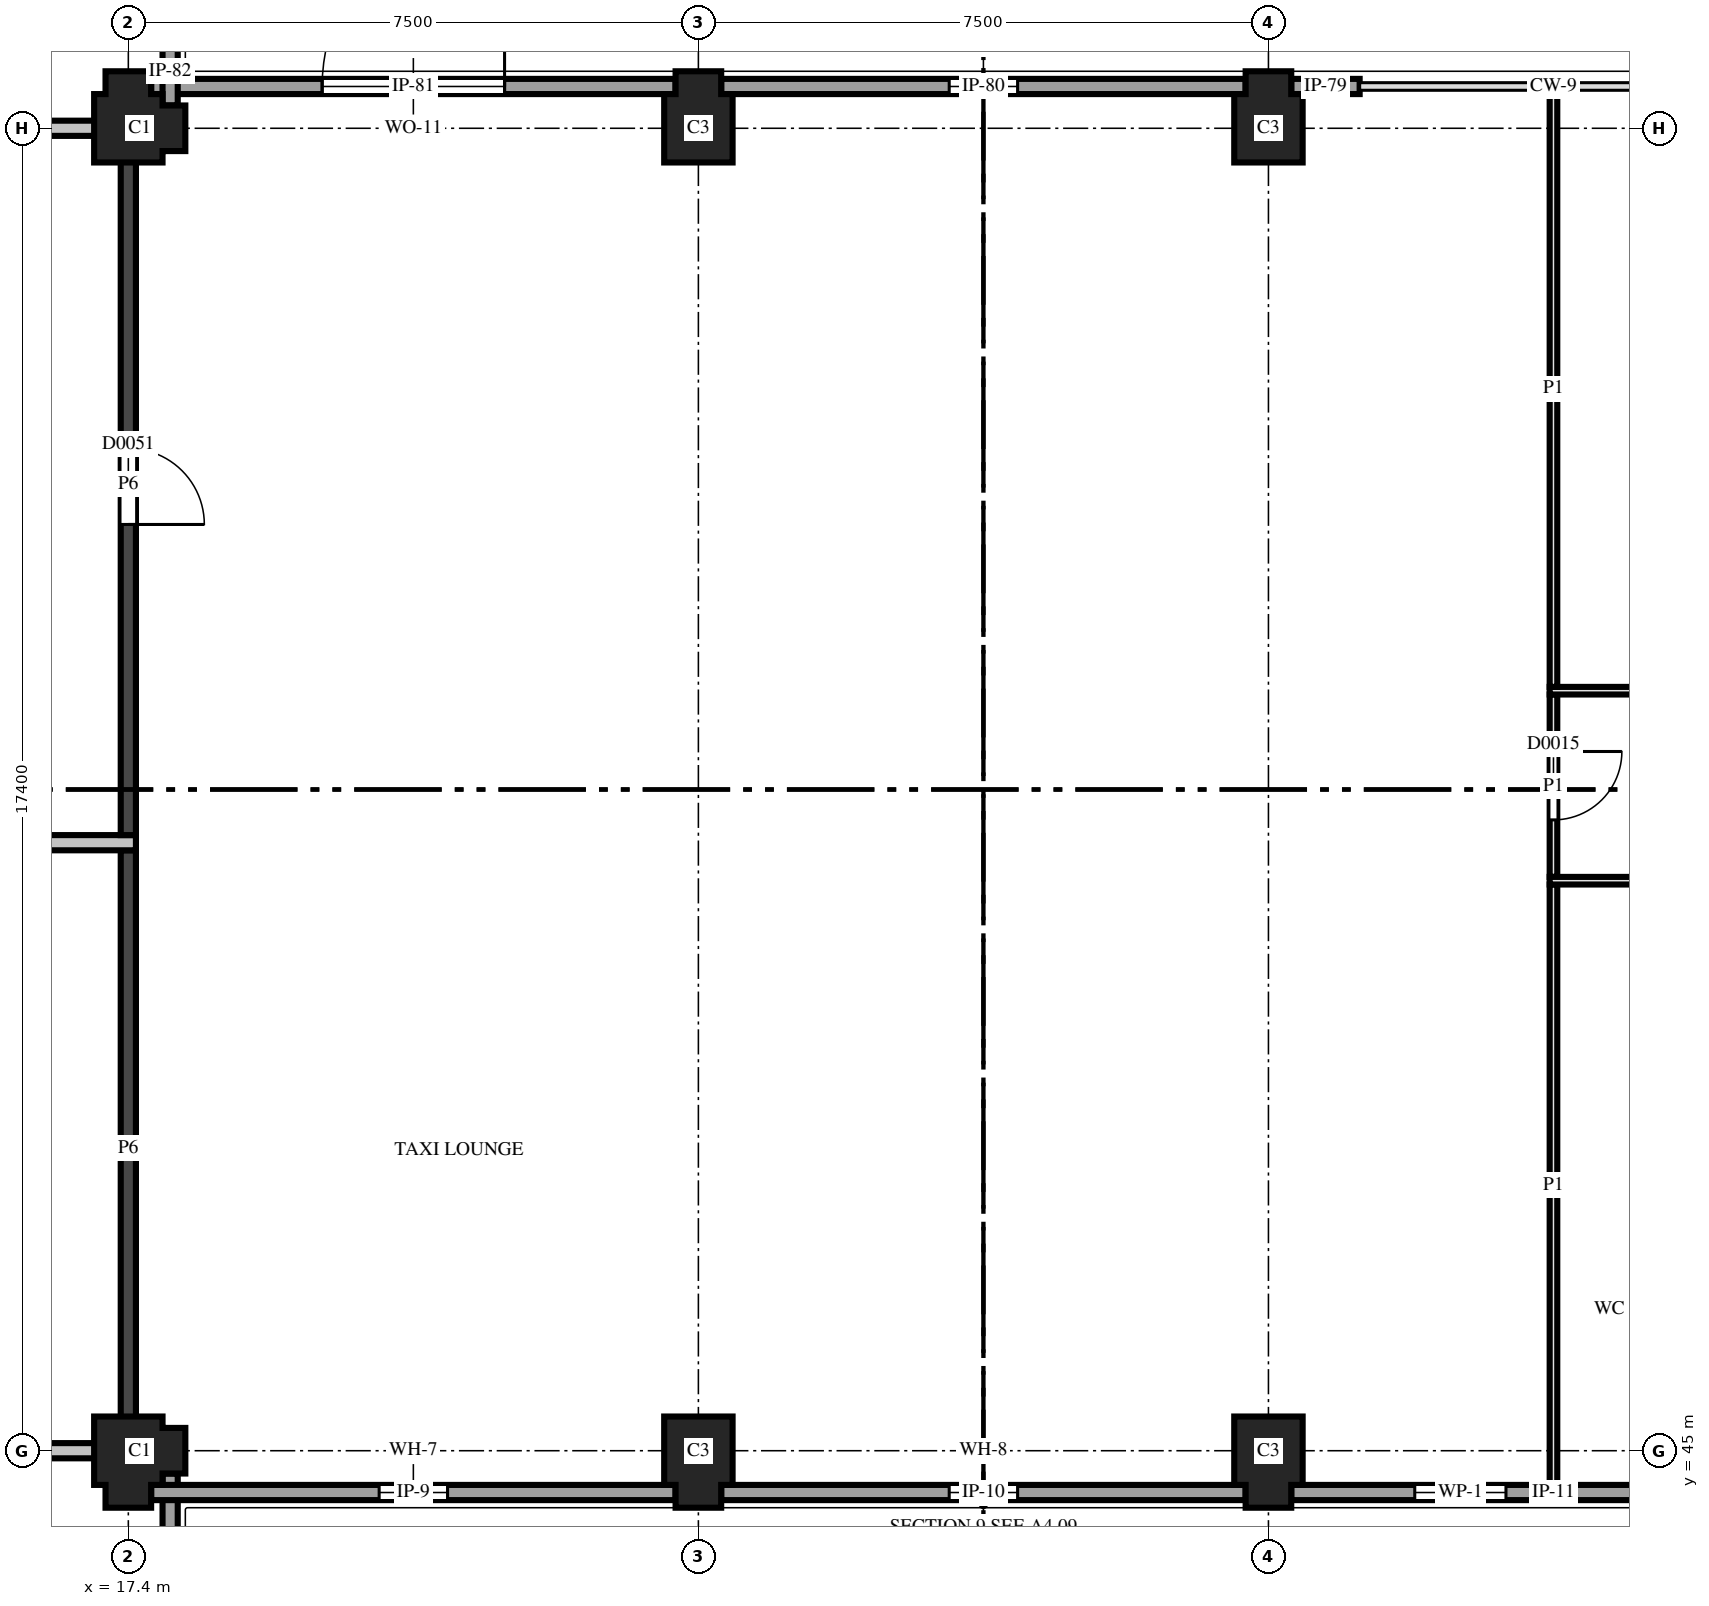
"""IFC4 building model, lengths in metres.
Left out: names, types, materials, properties, quantities, classifications, styles, units other than length and angle.
Written with IfcOpenShell. Run it as: python <this file> out.ifc"""

import sys

from ifc_helpers import new_model, si_unit, direction, frame, frame_2d, origin, place, context, subcontext, project, spatial, polyline, rectangle, outline, extrude, element, fill, save


model = new_model("IFC4")
c1 = context("Model", 3, precision=1e-05, world=origin(), true_north=direction((0.0, 1.0)))
c2 = subcontext(c1, "Body", "Model", "MODEL_VIEW")
j1 = project(units=[si_unit("LENGTHUNIT", "METRE"), si_unit("PLANEANGLEUNIT", "RADIAN")], contexts=[c1])
p1 = place(None, origin())
s1 = spatial("IfcSite", under=j1, at=p1, CompositionType="ELEMENT")
p2 = place(p1, origin())
s2 = spatial("IfcBuilding", under=s1, at=p2, CompositionType="ELEMENT")
p3 = place(p2, origin())
s3 = spatial("IfcBuildingStorey", under=s2, at=p3, CompositionType="ELEMENT", Elevation=0.0)
p4 = place(p3, frame((17.4, 45.0, 0.0), z_axis=(0.0, 0.0, 1.0), x_axis=(0.0, -1.0, 0.0)))
e1 = element("IfcColumn", 1, at=p4, inside=s3, PredefinedType="COLUMN", context=c2, shape_type="SweptSolid", body=[
    extrude(outline(polyline([(-0.45, -0.45), (0.45, -0.45), (0.45, -0.3), (0.75, -0.3), (0.75, 0.3), (0.45, 0.3), (0.45, 0.45), (0.3, 0.45), (0.3, 0.75), (-0.3, 0.75), (-0.3, 0.45), (-0.45, 0.45), (-0.45, -0.45)])), origin(), (0.0, 0.0, 1.0), 4.5),
])
for number, where, z_axis, x_axis in (
    (2, (24.9, 45.0, 0.0), (0.0, 0.0, 1.0), (0.0, -1.0, 0.0)),
    (3, (32.4, 45.0, 0.0), (0.0, 0.0, 1.0), (0.0, -1.0, 0.0)),
):
    element("IfcColumn", number, at=place(p3, frame(where, z_axis=z_axis, x_axis=x_axis)), inside=s3, PredefinedType="COLUMN", context=c2, shape_type="SweptSolid", body=[
        extrude(outline(polyline([(-0.45, -0.45), (0.45, -0.45), (0.45, -0.3), (0.75, -0.3), (0.75, 0.3), (0.45, 0.3), (0.45, 0.45), (-0.45, 0.45), (-0.45, -0.45)])), origin(), (0.0, 0.0, 1.0), 4.5),
    ])
p5 = place(p3, frame((17.4, 62.4, 0.0), z_axis=(0.0, 0.0, 1.0), x_axis=(1.0, 0.0, 0.0)))
e4 = element("IfcColumn", 4, at=p5, inside=s3, PredefinedType="COLUMN", context=c2, shape_type="SweptSolid", body=[
    extrude(outline(polyline([(-0.45, -0.45), (0.45, -0.45), (0.45, -0.3), (0.75, -0.3), (0.75, 0.3), (0.45, 0.3), (0.45, 0.45), (0.3, 0.45), (0.3, 0.75), (-0.3, 0.75), (-0.3, 0.45), (-0.45, 0.45), (-0.45, -0.45)])), origin(), (0.0, 0.0, 1.0), 4.5),
])
for number, where, z_axis, x_axis in (
    (5, (24.9, 62.4, 0.0), (0.0, 0.0, 1.0), (0.0, 1.0, 0.0)),
    (6, (32.4, 62.4, 0.0), (0.0, 0.0, 1.0), (0.0, 1.0, 0.0)),
):
    element("IfcColumn", number, at=place(p3, frame(where, z_axis=z_axis, x_axis=x_axis)), inside=s3, PredefinedType="COLUMN", context=c2, shape_type="SweptSolid", body=[
        extrude(outline(polyline([(-0.45, -0.45), (0.45, -0.45), (0.45, -0.3), (0.75, -0.3), (0.75, 0.3), (0.45, 0.3), (0.45, 0.45), (-0.45, 0.45), (-0.45, -0.45)])), origin(), (0.0, 0.0, 1.0), 4.5),
    ])
p6 = place(p3, frame((17.95, 37.8, 0.0), z_axis=(0.0, 0.0, 1.0), x_axis=(0.0, 1.0, 0.0)))
e7 = element("IfcWall", 7, at=p6, inside=s3, PredefinedType="SOLIDWALL", context=c2, shape_type="SweptSolid", body=[
    extrude(outline(polyline([(0.0, 0.0), (6.9, 0.0), (6.9, 3.1), (6.002, 3.1), (6.0, 2.4), (5.681, 2.56), (5.363, 2.695), (5.044, 2.806), (4.725, 2.895), (4.406, 2.963), (4.087, 3.012), (3.769, 3.041), (3.45, 3.05), (3.131, 3.041), (2.812, 3.012), (2.494, 2.963), (2.175, 2.895), (1.856, 2.806), (1.538, 2.695), (1.219, 2.56), (0.9, 2.4), (0.898, 3.1), (0.0, 3.1), (0.0, 0.0)])), frame((0.0, 0.1, 0.0), z_axis=(0.0, -1.0, 0.0), x_axis=(1.0, 0.0, 0.0)), (0.0, 0.0, 1.0), 0.2),
])
p7 = place(p6, frame((3.0, 0.0, 2.4)))
e8 = element("IfcOpeningElement", 8, at=p7, cuts=e7, PredefinedType="OPENING", context=c2, shape_type="SweptSolid", body=[
    extrude(rectangle(XDim=0.9, YDim=0.531, at=frame_2d((0.45, 0.266))), frame((0.0, 0.11, 0.0), z_axis=(0.0, -1.0, 0.0), x_axis=(1.0, 0.0, 0.0)), (0.0, 0.0, 1.0), 0.22),
])
p8 = place(p3, frame((17.7, 44.45, 0.0), z_axis=(0.0, 0.0, 1.0), x_axis=(1.0, 0.0, 0.0)))
e9 = element("IfcWall", 9, at=p8, inside=s3, PredefinedType="SOLIDWALL", context=c2, shape_type="SweptSolid", body=[
    extrude(outline(polyline([(0.0, 0.0), (6.9, 0.0), (6.9, 3.1), (6.002, 3.1), (6.0, 2.4), (5.681, 2.56), (5.363, 2.695), (5.044, 2.806), (4.725, 2.895), (4.406, 2.963), (4.087, 3.012), (3.769, 3.041), (3.45, 3.05), (3.131, 3.041), (2.812, 3.012), (2.494, 2.963), (2.175, 2.895), (1.856, 2.806), (1.538, 2.695), (1.219, 2.56), (0.9, 2.4), (0.898, 3.1), (0.0, 3.1), (0.0, 0.0)])), frame((0.0, 0.1, 0.0), z_axis=(0.0, -1.0, 0.0), x_axis=(1.0, 0.0, 0.0)), (0.0, 0.0, 1.0), 0.2),
])
p9 = place(p8, frame((3.0, 0.0, 2.4)))
e10 = element("IfcOpeningElement", 10, at=p9, cuts=e9, PredefinedType="OPENING", context=c2, shape_type="SweptSolid", body=[
    extrude(rectangle(XDim=0.9, YDim=0.531, at=frame_2d((0.45, 0.266))), frame((0.0, 0.11, 0.0), z_axis=(0.0, -1.0, 0.0), x_axis=(1.0, 0.0, 0.0)), (0.0, 0.0, 1.0), 0.22),
])
p10 = place(p3, frame((25.2, 44.45, 0.0), z_axis=(0.0, 0.0, 1.0), x_axis=(1.0, 0.0, 0.0)))
e11 = element("IfcWall", 11, at=p10, inside=s3, PredefinedType="SOLIDWALL", context=c2, shape_type="SweptSolid", body=[
    extrude(outline(polyline([(0.0, 0.0), (6.9, 0.0), (6.9, 3.1), (6.002, 3.1), (6.0, 2.4), (5.681, 2.56), (5.363, 2.695), (5.044, 2.806), (4.725, 2.895), (4.406, 2.963), (4.087, 3.012), (3.769, 3.041), (3.45, 3.05), (3.131, 3.041), (2.812, 3.012), (2.494, 2.963), (2.175, 2.895), (1.856, 2.806), (1.538, 2.695), (1.219, 2.56), (0.9, 2.4), (0.898, 3.1), (0.0, 3.1), (0.0, 0.0)])), frame((0.0, 0.1, 0.0), z_axis=(0.0, -1.0, 0.0), x_axis=(1.0, 0.0, 0.0)), (0.0, 0.0, 1.0), 0.2),
])
p11 = place(p10, frame((3.0, 0.0, 2.4)))
e12 = element("IfcOpeningElement", 12, at=p11, cuts=e11, PredefinedType="OPENING", context=c2, shape_type="SweptSolid", body=[
    extrude(rectangle(XDim=0.9, YDim=0.531, at=frame_2d((0.45, 0.266))), frame((0.0, 0.11, 0.0), z_axis=(0.0, -1.0, 0.0), x_axis=(1.0, 0.0, 0.0)), (0.0, 0.0, 1.0), 0.22),
])
p12 = place(p3, frame((32.7, 44.45, 0.0), z_axis=(0.0, 0.0, 1.0), x_axis=(1.0, 0.0, 0.0)))
e13 = element("IfcWall", 13, at=p12, inside=s3, PredefinedType="SOLIDWALL", context=c2, shape_type="SweptSolid", body=[
    extrude(outline(polyline([(0.0, 0.0), (6.9, 0.0), (6.9, 3.1), (6.002, 3.1), (6.0, 2.4), (5.681, 2.56), (5.363, 2.695), (5.044, 2.806), (4.725, 2.895), (4.406, 2.963), (4.087, 3.012), (3.769, 3.041), (3.45, 3.05), (3.131, 3.041), (2.812, 3.012), (2.494, 2.963), (2.175, 2.895), (1.856, 2.806), (1.538, 2.695), (1.219, 2.56), (0.9, 2.4), (0.898, 3.1), (0.0, 3.1), (0.0, 0.0)])), frame((0.0, 0.1, 0.0), z_axis=(0.0, -1.0, 0.0), x_axis=(1.0, 0.0, 0.0)), (0.0, 0.0, 1.0), 0.2),
])
p13 = place(p12, frame((1.625, 0.0, 0.6)))
e14 = element("IfcOpeningElement", 14, at=p13, cuts=e13, PredefinedType="OPENING", context=c2, shape_type="SweptSolid", body=[
    extrude(rectangle(XDim=1.2, YDim=1.2, at=frame_2d((0.6, 0.6))), frame((0.0, 0.11, 0.0), z_axis=(0.0, -1.0, 0.0), x_axis=(1.0, 0.0, 0.0)), (0.0, 0.0, 1.0), 0.22),
])
p14 = place(p3, frame((33.6, 62.95, 0.0), z_axis=(0.0, 0.0, 1.0), x_axis=(-1.0, 0.0, 0.0)))
e15 = element("IfcWall", 15, at=p14, inside=s3, PredefinedType="SOLIDWALL", context=c2, shape_type="SweptSolid", body=[
    extrude(rectangle(XDim=0.9, YDim=0.2, at=frame_2d((0.45, 0.0))), origin(), (0.0, 0.0, 1.0), 3.1),
])
p15 = place(p3, frame((32.1, 62.95, 0.0), z_axis=(0.0, 0.0, 1.0), x_axis=(-1.0, 0.0, 0.0)))
e16 = element("IfcWall", 16, at=p15, inside=s3, PredefinedType="SOLIDWALL", context=c2, shape_type="SweptSolid", body=[
    extrude(outline(polyline([(0.0, 0.0), (6.9, 0.0), (6.9, 3.1), (6.002, 3.1), (6.0, 2.4), (5.681, 2.56), (5.363, 2.695), (5.044, 2.806), (4.725, 2.895), (4.406, 2.963), (4.087, 3.012), (3.769, 3.041), (3.45, 3.05), (3.131, 3.041), (2.812, 3.012), (2.494, 2.963), (2.175, 2.895), (1.856, 2.806), (1.538, 2.695), (1.219, 2.56), (0.9, 2.4), (0.898, 3.1), (0.0, 3.1), (0.0, 0.0)])), frame((0.0, 0.1, 0.0), z_axis=(0.0, -1.0, 0.0), x_axis=(1.0, 0.0, 0.0)), (0.0, 0.0, 1.0), 0.2),
])
p16 = place(p15, frame((3.0, 0.0, 2.4)))
e17 = element("IfcOpeningElement", 17, at=p16, cuts=e16, PredefinedType="OPENING", context=c2, shape_type="SweptSolid", body=[
    extrude(rectangle(XDim=0.9, YDim=0.531, at=frame_2d((0.45, 0.266))), frame((0.0, 0.11, 0.0), z_axis=(0.0, -1.0, 0.0), x_axis=(1.0, 0.0, 0.0)), (0.0, 0.0, 1.0), 0.22),
])
p17 = place(p3, frame((24.6, 62.95, 0.0), z_axis=(0.0, 0.0, 1.0), x_axis=(-1.0, 0.0, 0.0)))
e18 = element("IfcWall", 18, at=p17, inside=s3, PredefinedType="SOLIDWALL", context=c2, shape_type="SweptSolid", body=[
    extrude(outline(polyline([(0.0, 0.0), (6.9, 0.0), (6.9, 3.1), (6.002, 3.1), (6.0, 2.4), (5.681, 2.56), (5.363, 2.695), (5.044, 2.806), (4.725, 2.895), (4.406, 2.963), (4.087, 3.012), (3.769, 3.041), (3.45, 3.05), (3.131, 3.041), (2.812, 3.012), (2.494, 2.963), (2.175, 2.895), (1.856, 2.806), (1.538, 2.695), (1.219, 2.56), (0.9, 2.4), (0.898, 3.1), (0.0, 3.1), (0.0, 0.0)])), frame((0.0, 0.1, 0.0), z_axis=(0.0, -1.0, 0.0), x_axis=(1.0, 0.0, 0.0)), (0.0, 0.0, 1.0), 0.2),
])
p18 = place(p17, frame((2.25, 0.0, 0.0)))
e19 = element("IfcOpeningElement", 19, at=p18, cuts=e18, PredefinedType="OPENING", context=c2, shape_type="SweptSolid", body=[
    extrude(rectangle(XDim=2.4, YDim=2.1, at=frame_2d((1.2, 1.05))), frame((0.0, 0.11, 0.0), z_axis=(0.0, -1.0, 0.0), x_axis=(1.0, 0.0, 0.0)), (0.0, 0.0, 1.0), 0.22),
])
p19 = place(p17, frame((2.25, 0.0, 2.25)))
e20 = element("IfcOpeningElement", 20, at=p19, cuts=e18, PredefinedType="OPENING", context=c2, shape_type="SweptSolid", body=[
    extrude(rectangle(XDim=2.4, YDim=0.563, at=frame_2d((1.2, 0.281))), frame((0.0, 0.11, 0.0), z_axis=(0.0, -1.0, 0.0), x_axis=(1.0, 0.0, 0.0)), (0.0, 0.0, 1.0), 0.22),
])
p20 = place(p3, frame((17.95, 62.7, 0.0), z_axis=(0.0, 0.0, 1.0), x_axis=(0.0, 1.0, 0.0)))
e21 = element("IfcWall", 21, at=p20, inside=s3, PredefinedType="SOLIDWALL", context=c2, shape_type="SweptSolid", body=[
    extrude(rectangle(XDim=0.9, YDim=0.2, at=frame_2d((0.45, 0.0))), origin(), (0.0, 0.0, 1.0), 3.1),
])
p21 = place(p3, frame((9.0, 45.0, 0.0), z_axis=(0.0, 0.0, 1.0), x_axis=(1.0, 0.0, 0.0)))
e22 = element("IfcWall", 22, at=p21, inside=s3, PredefinedType="PARTITIONING", context=c2, shape_type="SweptSolid", body=[
    extrude(rectangle(XDim=8.34, YDim=0.2, at=frame_2d((4.17, 0.0))), origin(), (0.0, 0.0, 1.0), 3.68),
])
p22 = place(p3, frame((17.4, 45.06, 0.0), z_axis=(0.0, 0.0, 1.0), x_axis=(0.0, 1.0, 0.0)))
e23 = element("IfcWall", 23, at=p22, inside=s3, PredefinedType="PARTITIONING", context=c2, shape_type="SweptSolid", body=[
    extrude(rectangle(XDim=7.84, YDim=0.2, at=frame_2d((3.92, 0.0))), origin(), (0.0, 0.0, 1.0), 3.0),
])
p23 = place(p3, frame((36.15, 44.55, 0.0), z_axis=(0.0, 0.0, 1.0), x_axis=(0.0, 1.0, 0.0)))
e24 = element("IfcWall", 24, at=p23, inside=s3, PredefinedType="PARTITIONING", context=c2, shape_type="SweptSolid", body=[
    extrude(rectangle(XDim=7.9, YDim=0.1, at=frame_2d((3.95, 0.0))), origin(), (0.0, 0.0, 1.0), 3.68),
])
p24 = place(p3, frame((36.15, 52.55, 0.0), z_axis=(0.0, 0.0, 1.0), x_axis=(0.0, 1.0, 0.0)))
e25 = element("IfcWall", 25, at=p24, inside=s3, PredefinedType="PARTITIONING", context=c2, shape_type="SweptSolid", body=[
    extrude(rectangle(XDim=2.4, YDim=0.1, at=frame_2d((1.2, 0.0))), origin(), (0.0, 0.0, 1.0), 3.68),
])
p25 = place(p24, frame((0.75, 0.0, 0.0)))
e26 = element("IfcOpeningElement", 26, at=p25, cuts=e25, PredefinedType="OPENING", context=c2, shape_type="SweptSolid", body=[
    extrude(rectangle(XDim=0.9, YDim=2.1, at=frame_2d((0.45, 1.05))), frame((0.0, 0.06, 0.0), z_axis=(0.0, -1.0, 0.0), x_axis=(1.0, 0.0, 0.0)), (0.0, 0.0, 1.0), 0.12),
])
p26 = place(p3, frame((42.4, 52.5, 0.0), z_axis=(0.0, 0.0, 1.0), x_axis=(-1.0, 0.0, 0.0)))
e27 = element("IfcWall", 27, at=p26, inside=s3, PredefinedType="PARTITIONING", context=c2, shape_type="SweptSolid", body=[
    extrude(rectangle(XDim=6.3, YDim=0.1, at=frame_2d((3.15, 0.0))), origin(), (0.0, 0.0, 1.0), 3.68),
])
p27 = place(p26, frame((2.7, 0.0, 0.0)))
e28 = element("IfcOpeningElement", 28, at=p27, cuts=e27, PredefinedType="OPENING", context=c2, shape_type="SweptSolid", body=[
    extrude(rectangle(XDim=0.9, YDim=2.1, at=frame_2d((0.45, 1.05))), frame((0.0, 0.06, 0.0), z_axis=(0.0, -1.0, 0.0), x_axis=(1.0, 0.0, 0.0)), (0.0, 0.0, 1.0), 0.12),
])
p28 = place(p3, frame((17.5, 53.0, 0.0), z_axis=(0.0, 0.0, 1.0), x_axis=(-1.0, 0.0, 0.0)))
e29 = element("IfcWall", 29, at=p28, inside=s3, PredefinedType="PARTITIONING", context=c2, shape_type="SweptSolid", body=[
    extrude(rectangle(XDim=8.6, YDim=0.2, at=frame_2d((4.3, 0.0))), origin(), (0.0, 0.0, 1.0), 3.68),
])
p29 = place(p3, frame((17.4, 53.1, 0.0), z_axis=(0.0, 0.0, 1.0), x_axis=(0.0, 1.0, 0.0)))
e30 = element("IfcWall", 30, at=p29, inside=s3, PredefinedType="PARTITIONING", context=c2, shape_type="SweptSolid", body=[
    extrude(rectangle(XDim=9.24, YDim=0.2, at=frame_2d((4.62, 0.0))), origin(), (0.0, 0.0, 1.0), 3.0),
])
p30 = place(p29, frame((4.087, 0.0, 0.0)))
e31 = element("IfcOpeningElement", 31, at=p30, cuts=e30, PredefinedType="OPENING", context=c2, shape_type="SweptSolid", body=[
    extrude(rectangle(XDim=1.0, YDim=2.1, at=frame_2d((0.5, 1.05))), frame((0.0, 0.11, 0.0), z_axis=(0.0, -1.0, 0.0), x_axis=(1.0, 0.0, 0.0)), (0.0, 0.0, 1.0), 0.22),
])
p31 = place(p3, frame((36.1, 55.0, 0.0), z_axis=(0.0, 0.0, 1.0), x_axis=(1.0, 0.0, 0.0)))
e32 = element("IfcWall", 32, at=p31, inside=s3, PredefinedType="PARTITIONING", context=c2, shape_type="SweptSolid", body=[
    extrude(rectangle(XDim=16.3, YDim=0.1, at=frame_2d((8.15, 0.0))), origin(), (0.0, 0.0, 1.0), 3.68),
])
p32 = place(p31, frame((7.7, 0.0, 0.0)))
e33 = element("IfcOpeningElement", 33, at=p32, cuts=e32, PredefinedType="OPENING", context=c2, shape_type="SweptSolid", body=[
    extrude(rectangle(XDim=0.9, YDim=2.1, at=frame_2d((0.45, 1.05))), frame((0.0, 0.06, 0.0), z_axis=(0.0, -1.0, 0.0), x_axis=(1.0, 0.0, 0.0)), (0.0, 0.0, 1.0), 0.12),
])
p33 = place(p3, frame((36.15, 55.05, 0.0), z_axis=(0.0, 0.0, 1.0), x_axis=(0.0, 1.0, 0.0)))
e34 = element("IfcWall", 34, at=p33, inside=s3, PredefinedType="PARTITIONING", context=c2, shape_type="SweptSolid", body=[
    extrude(rectangle(XDim=7.85, YDim=0.1, at=frame_2d((3.925, 0.0))), origin(), (0.0, 0.0, 1.0), 3.68),
])
p34 = place(p3, frame((17.34, 62.4, 0.0), z_axis=(0.0, 0.0, 1.0), x_axis=(-1.0, 0.0, 0.0)))
e35 = element("IfcWall", 35, at=p34, inside=s3, PredefinedType="PARTITIONING", context=c2, shape_type="SweptSolid", body=[
    extrude(rectangle(XDim=2.34, YDim=0.2, at=frame_2d((1.17, 0.0))), origin(), (0.0, 0.0, 1.0), 3.68),
])
p35 = place(p9, origin())
e36 = element("IfcWindow", 36, at=p35, inside=s3, PartitioningType="SINGLE_PANEL", PredefinedType="WINDOW", context=c2, shape_type="SweptSolid", body=[
    extrude(rectangle(XDim=0.9, YDim=0.531, at=frame_2d((0.45, 0.266))), frame((0.0, 0.03, 0.0), z_axis=(0.0, -1.0, 0.0), x_axis=(1.0, 0.0, 0.0)), (0.0, 0.0, 1.0), 0.06),
])
fill(e10, e36)
p36 = place(p11, origin())
e37 = element("IfcWindow", 37, at=p36, inside=s3, PartitioningType="SINGLE_PANEL", PredefinedType="WINDOW", context=c2, shape_type="SweptSolid", body=[
    extrude(rectangle(XDim=0.9, YDim=0.531, at=frame_2d((0.45, 0.266))), frame((0.0, 0.03, 0.0), z_axis=(0.0, -1.0, 0.0), x_axis=(1.0, 0.0, 0.0)), (0.0, 0.0, 1.0), 0.06),
])
fill(e12, e37)
p37 = place(p13, origin())
e38 = element("IfcWindow", 38, at=p37, inside=s3, PartitioningType="SINGLE_PANEL", PredefinedType="WINDOW", context=c2, shape_type="SweptSolid", body=[
    extrude(rectangle(XDim=1.2, YDim=1.2, at=frame_2d((0.6, 0.6))), frame((0.0, 0.03, 0.0), z_axis=(0.0, -1.0, 0.0), x_axis=(1.0, 0.0, 0.0)), (0.0, 0.0, 1.0), 0.06),
])
fill(e14, e38)
p38 = place(p16, origin())
e39 = element("IfcWindow", 39, at=p38, inside=s3, PartitioningType="SINGLE_PANEL", PredefinedType="WINDOW", context=c2, shape_type="SweptSolid", body=[
    extrude(rectangle(XDim=0.9, YDim=0.531, at=frame_2d((0.45, 0.266))), frame((0.0, 0.03, 0.0), z_axis=(0.0, -1.0, 0.0), x_axis=(1.0, 0.0, 0.0)), (0.0, 0.0, 1.0), 0.06),
])
fill(e17, e39)
p39 = place(p18, frame((2.4, 0.0, 0.0), z_axis=(0.0, 0.0, 1.0), x_axis=(-1.0, 0.0, 0.0)))
e40 = element("IfcDoor", 40, at=p39, inside=s3, OperationType="SINGLE_SWING_LEFT", PredefinedType="DOOR", context=c2, shape_type="SweptSolid", body=[
    extrude(rectangle(XDim=2.4, YDim=2.1, at=frame_2d((1.2, 1.05))), frame((0.0, 0.025, 0.0), z_axis=(0.0, -1.0, 0.0), x_axis=(1.0, 0.0, 0.0)), (0.0, 0.0, 1.0), 0.05),
])
fill(e19, e40)
p40 = place(p19, origin())
e41 = element("IfcWindow", 41, at=p40, inside=s3, PartitioningType="SINGLE_PANEL", PredefinedType="WINDOW", context=c2, shape_type="SweptSolid", body=[
    extrude(rectangle(XDim=2.4, YDim=0.563, at=frame_2d((1.2, 0.281))), frame((0.0, 0.03, 0.0), z_axis=(0.0, -1.0, 0.0), x_axis=(1.0, 0.0, 0.0)), (0.0, 0.0, 1.0), 0.06),
])
fill(e20, e41)
p41 = place(p25, origin())
e42 = element("IfcDoor", 42, at=p41, inside=s3, OperationType="SINGLE_SWING_RIGHT", PredefinedType="DOOR", context=c2, shape_type="SweptSolid", body=[
    extrude(rectangle(XDim=0.9, YDim=2.1, at=frame_2d((0.45, 1.05))), frame((0.0, 0.025, 0.0), z_axis=(0.0, -1.0, 0.0), x_axis=(1.0, 0.0, 0.0)), (0.0, 0.0, 1.0), 0.05),
])
fill(e26, e42)
p42 = place(p30, origin())
e43 = element("IfcDoor", 43, at=p42, inside=s3, OperationType="SINGLE_SWING_LEFT", PredefinedType="DOOR", context=c2, shape_type="SweptSolid", body=[
    extrude(rectangle(XDim=1.0, YDim=2.1, at=frame_2d((0.5, 1.05))), frame((0.0, 0.025, 0.0), z_axis=(0.0, -1.0, 0.0), x_axis=(1.0, 0.0, 0.0)), (0.0, 0.0, 1.0), 0.05),
])
fill(e31, e43)
save(model, sys.argv[1])
